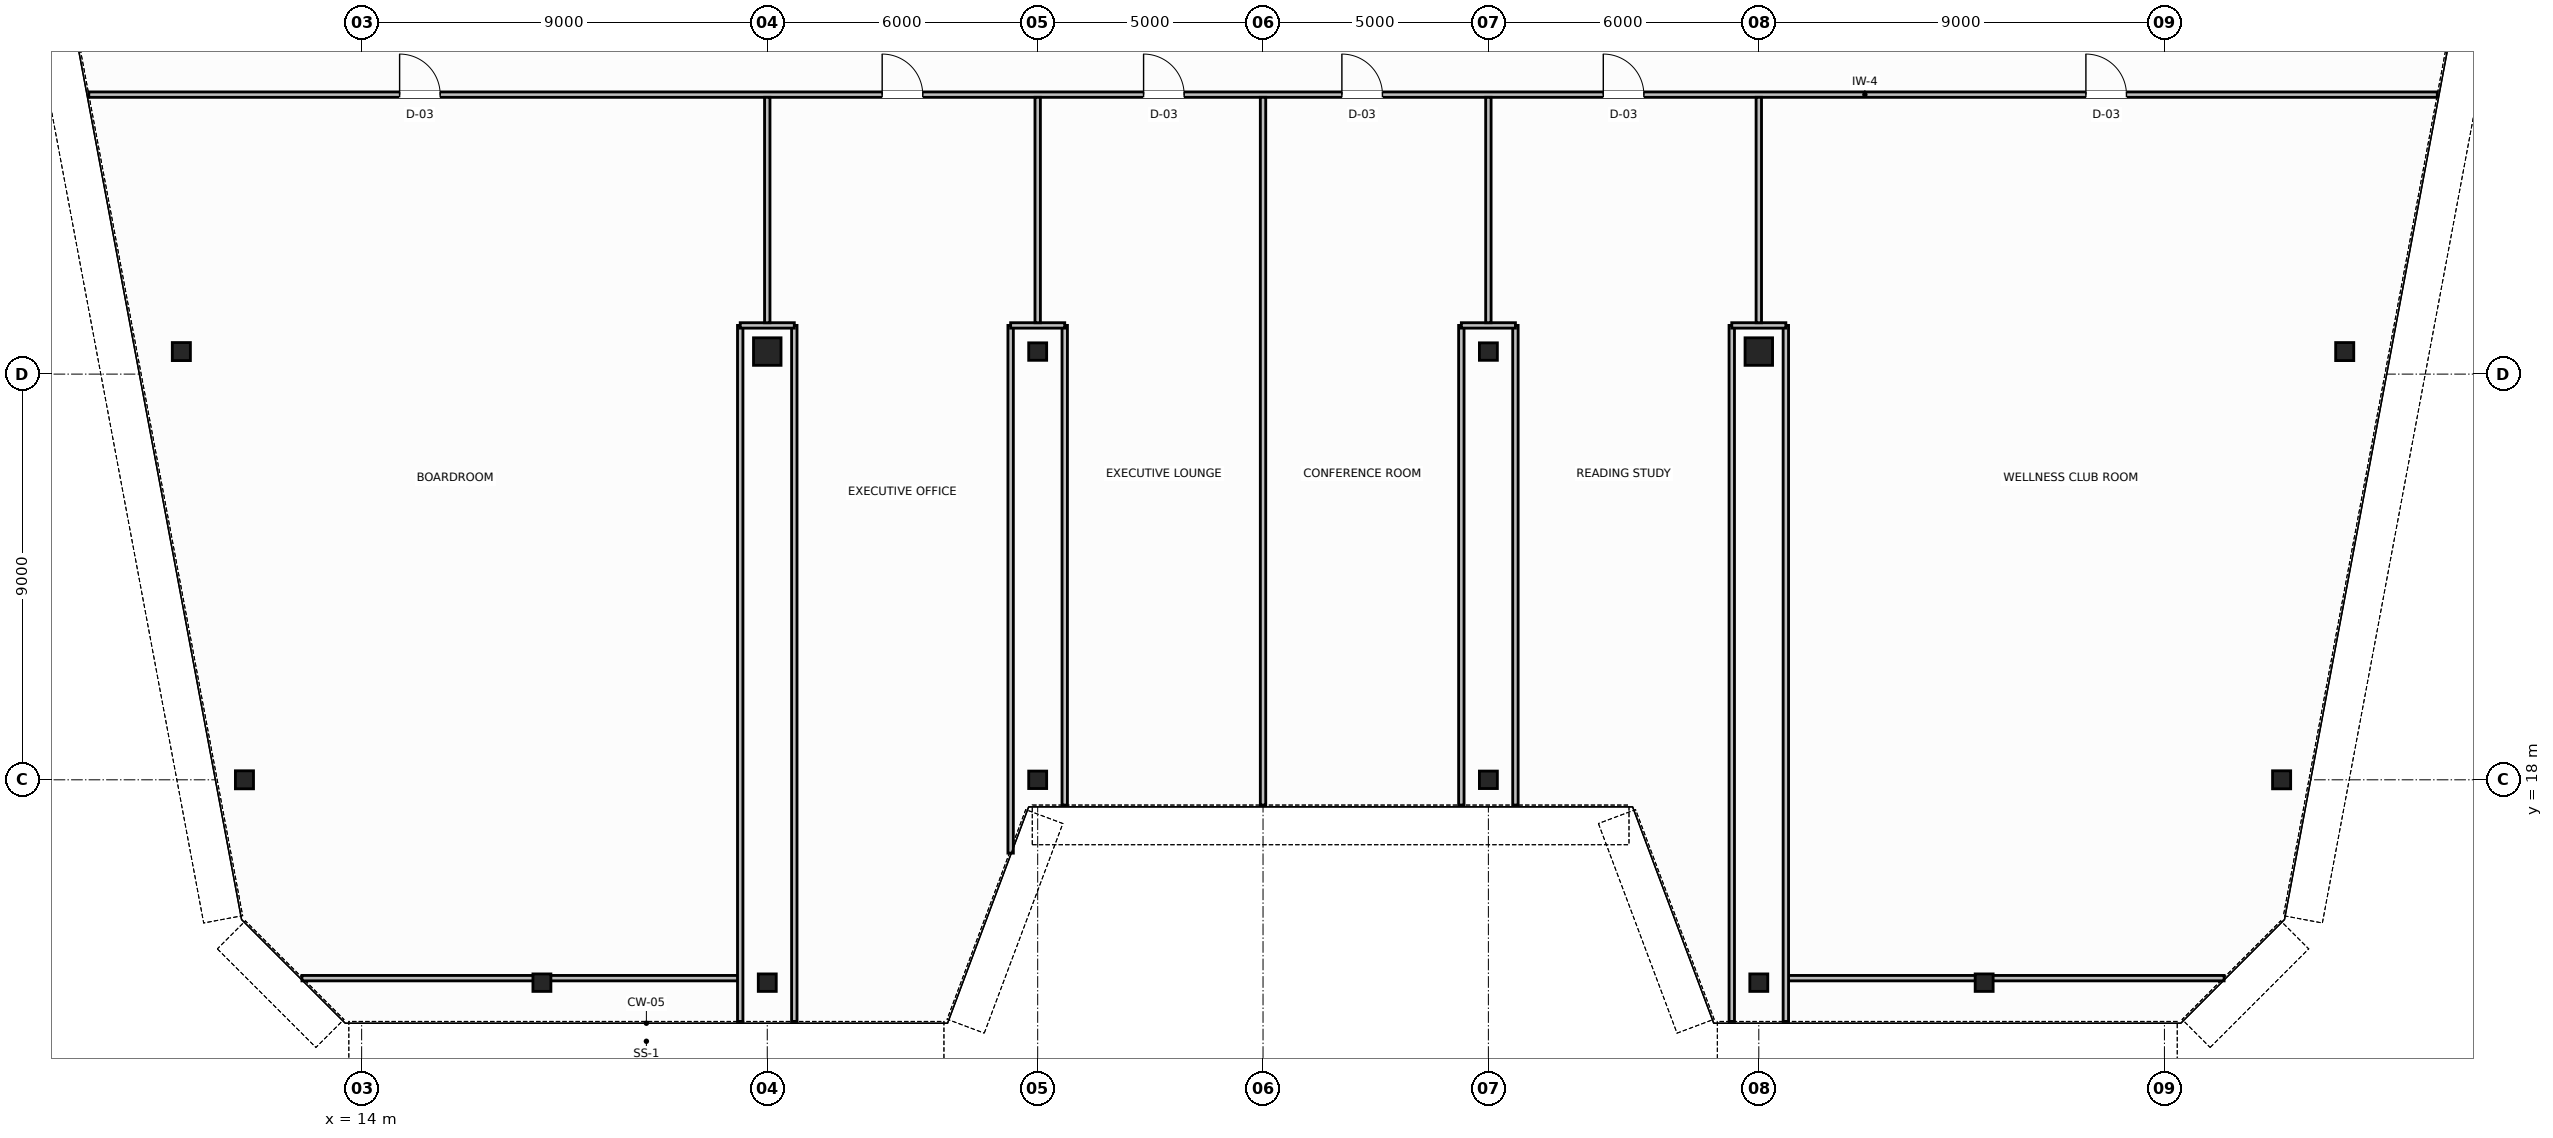
"""IFC4 building model, lengths in metres.
Left out: names, types, materials, properties, quantities, classifications, styles, units other than length and angle.
Written with IfcOpenShell. Run it as: python <this file> out.ifc"""

import sys

from ifc_helpers import new_model, si_unit, direction, frame, frame_2d, origin, origin_2d, place, context, subcontext, project, spatial, rectangle, hollow_circle, i_section, extrude, source, transform, mapped, element, fill, save


model = new_model("IFC4")
c1 = context("Model", 3, precision=1e-05, world=origin(), true_north=direction((0.0, 1.0)))
c2 = subcontext(c1, "Body", "Model", "MODEL_VIEW")
j1 = project(units=[si_unit("LENGTHUNIT", "METRE"), si_unit("PLANEANGLEUNIT", "RADIAN")], contexts=[c1])
p1 = place(None, origin())
s1 = spatial("IfcSite", under=j1, at=p1, CompositionType="ELEMENT")
p2 = place(p1, origin())
s2 = spatial("IfcBuilding", under=s1, at=p2, CompositionType="ELEMENT")
p3 = place(p2, frame((0.0, 0.0, 299.2)))
s3 = spatial("IfcBuildingStorey", under=s2, at=p3, CompositionType="ELEMENT", Elevation=299.2)
m1 = source(origin(), c2, "Body", "SweptSolid", [
    extrude(i_section(OverallWidth=0.401, OverallDepth=0.399, WebThickness=0.025, FlangeThickness=0.035, FilletRadius=0.015, at=origin_2d()), origin(), (0.0, 0.0, 1.0), 4.6),
])
for number, where, z_axis, x_axis in (
    (1, (10.0, 27.5, 0.0), (0.0, 0.0, 1.0), (1.0, 0.0, 0.0)),
    (2, (11.4, 18.0, 0.0), (0.0, 0.0, 1.0), (1.0, 0.0, 0.0)),
    (3, (58.0, 27.5, 0.0), (0.0, 0.0, 1.0), (1.0, 0.0, 0.0)),
    (4, (56.6, 18.0, 0.0), (0.0, 0.0, 1.0), (1.0, 0.0, 0.0)),
):
    element("IfcColumn", number, at=place(p3, frame(where, z_axis=z_axis, x_axis=x_axis)), inside=s3, PredefinedType="COLUMN", context=c2, shape_type="MappedRepresentation", body=[
        mapped(m1, transform((0.0, 0.0, 0.0), scale=1.0)),
    ])
m2 = source(origin(), c2, "Body", "SweptSolid", [
    extrude(hollow_circle(Radius=0.305, WallThickness=0.03, at=origin_2d()), origin(), (0.0, 0.0, 1.0), 4.6),
])
p4 = place(p3, frame((23.0, 27.5, 0.0), z_axis=(0.0, 0.0, 1.0), x_axis=(1.0, 0.0, 0.0)))
e5 = element("IfcColumn", 5, at=p4, inside=s3, PredefinedType="COLUMN", context=c2, shape_type="MappedRepresentation", body=[
    mapped(m2, transform((0.0, 0.0, 0.0), scale=1.0)),
])
m3 = source(origin(), c2, "Body", "SweptSolid", [
    extrude(i_section(OverallWidth=0.398, OverallDepth=0.387, WebThickness=0.021, FlangeThickness=0.029, FilletRadius=0.015, at=origin_2d()), origin(), (0.0, 0.0, 1.0), 4.6),
])
for number, where, z_axis, x_axis in (
    (6, (29.0, 27.5, 0.0), (0.0, 0.0, 1.0), (1.0, 0.0, 0.0)),
    (7, (39.0, 27.5, 0.0), (0.0, 0.0, 1.0), (1.0, 0.0, 0.0)),
):
    element("IfcColumn", number, at=place(p3, frame(where, z_axis=z_axis, x_axis=x_axis)), inside=s3, PredefinedType="COLUMN", context=c2, shape_type="MappedRepresentation", body=[
        mapped(m3, transform((0.0, 0.0, 0.0), scale=1.0)),
    ])
p5 = place(p3, frame((45.0, 27.5, 0.0), z_axis=(0.0, 0.0, 1.0), x_axis=(1.0, 0.0, 0.0)))
e8 = element("IfcColumn", 8, at=p5, inside=s3, PredefinedType="COLUMN", context=c2, shape_type="MappedRepresentation", body=[
    mapped(m2, transform((0.0, 0.0, 0.0), scale=1.0)),
])
for number, where, z_axis, x_axis in (
    (9, (18.0, 13.5, 0.0), (0.0, 0.0, 1.0), (1.0, 0.0, 0.0)),
    (10, (23.0, 13.5, 0.0), (0.0, 0.0, 1.0), (1.0, 0.0, 0.0)),
    (11, (29.0, 18.0, 0.0), (0.0, 0.0, 1.0), (1.0, 0.0, 0.0)),
    (12, (39.0, 18.0, 0.0), (0.0, 0.0, 1.0), (1.0, 0.0, 0.0)),
    (13, (45.0, 13.5, 0.0), (0.0, 0.0, 1.0), (1.0, 0.0, 0.0)),
    (14, (50.0, 13.5, 0.0), (0.0, 0.0, 1.0), (1.0, 0.0, 0.0)),
):
    element("IfcColumn", number, at=place(p3, frame(where, z_axis=z_axis, x_axis=x_axis)), inside=s3, PredefinedType="COLUMN", context=c2, shape_type="MappedRepresentation", body=[
        mapped(m3, transform((0.0, 0.0, 0.0), scale=1.0)),
    ])
p6 = place(p3, frame((7.946, 33.2, 0.0), z_axis=(0.0, 0.0, 1.0), x_axis=(1.0, 0.0, 0.0)))
e15 = element("IfcWall", 15, at=p6, inside=s3, PredefinedType="PARTITIONING", context=c2, shape_type="SweptSolid", body=[
    extrude(rectangle(XDim=52.109, YDim=0.12, at=frame_2d((26.054, 0.0))), origin(), (0.0, 0.0, 1.0), 3.93),
])
p7 = place(p6, frame((6.897, 0.0, 0.0)))
e16 = element("IfcOpeningElement", 16, at=p7, cuts=e15, PredefinedType="OPENING", context=c2, shape_type="SweptSolid", body=[
    extrude(rectangle(XDim=0.9, YDim=2.15, at=frame_2d((0.45, 1.075))), frame((0.0, 0.07, 0.0), z_axis=(0.0, -1.0, 0.0), x_axis=(1.0, 0.0, 0.0)), (0.0, 0.0, 1.0), 0.14),
])
p8 = place(p6, frame((17.604, 0.0, 0.0)))
e17 = element("IfcOpeningElement", 17, at=p8, cuts=e15, PredefinedType="OPENING", context=c2, shape_type="SweptSolid", body=[
    extrude(rectangle(XDim=0.9, YDim=2.15, at=frame_2d((0.45, 1.075))), frame((0.0, 0.07, 0.0), z_axis=(0.0, -1.0, 0.0), x_axis=(1.0, 0.0, 0.0)), (0.0, 0.0, 1.0), 0.14),
])
p9 = place(p6, frame((23.404, 0.0, 0.0)))
e18 = element("IfcOpeningElement", 18, at=p9, cuts=e15, PredefinedType="OPENING", context=c2, shape_type="SweptSolid", body=[
    extrude(rectangle(XDim=0.9, YDim=2.15, at=frame_2d((0.45, 1.075))), frame((0.0, 0.07, 0.0), z_axis=(0.0, -1.0, 0.0), x_axis=(1.0, 0.0, 0.0)), (0.0, 0.0, 1.0), 0.14),
])
p10 = place(p6, frame((27.804, 0.0, 0.0)))
e19 = element("IfcOpeningElement", 19, at=p10, cuts=e15, PredefinedType="OPENING", context=c2, shape_type="SweptSolid", body=[
    extrude(rectangle(XDim=0.9, YDim=2.15, at=frame_2d((0.45, 1.075))), frame((0.0, 0.07, 0.0), z_axis=(0.0, -1.0, 0.0), x_axis=(1.0, 0.0, 0.0)), (0.0, 0.0, 1.0), 0.14),
])
p11 = place(p6, frame((33.604, 0.0, 0.0)))
e20 = element("IfcOpeningElement", 20, at=p11, cuts=e15, PredefinedType="OPENING", context=c2, shape_type="SweptSolid", body=[
    extrude(rectangle(XDim=0.9, YDim=2.15, at=frame_2d((0.45, 1.075))), frame((0.0, 0.07, 0.0), z_axis=(0.0, -1.0, 0.0), x_axis=(1.0, 0.0, 0.0)), (0.0, 0.0, 1.0), 0.14),
])
p12 = place(p6, frame((44.312, 0.0, 0.0)))
e21 = element("IfcOpeningElement", 21, at=p12, cuts=e15, PredefinedType="OPENING", context=c2, shape_type="SweptSolid", body=[
    extrude(rectangle(XDim=0.9, YDim=2.15, at=frame_2d((0.45, 1.075))), frame((0.0, 0.07, 0.0), z_axis=(0.0, -1.0, 0.0), x_axis=(1.0, 0.0, 0.0)), (0.0, 0.0, 1.0), 0.14),
])
for number, where, z_axis, x_axis in (
    (22, (12.676, 13.6, 0.0), (0.0, 0.0, 1.0), (1.0, 0.0, 0.0)),
    (23, (45.64, 13.6, 0.0), (0.0, 0.0, 1.0), (1.0, 0.0, 0.0)),
):
    element("IfcWall", number, at=place(p3, frame(where, z_axis=z_axis, x_axis=x_axis)), inside=s3, PredefinedType="PARTITIONING", context=c2, shape_type="SweptSolid", body=[
        extrude(rectangle(XDim=9.684, YDim=0.12, at=frame_2d((4.842, 0.0))), origin(), (0.0, 0.0, 1.0), 3.09),
    ])
for number, where, z_axis, x_axis in (
    (24, (22.4, 12.64, 0.0), (0.0, 0.0, 1.0), (0.0, 1.0, 0.0)),
    (25, (23.6, 12.64, 0.0), (0.0, 0.0, 1.0), (0.0, 1.0, 0.0)),
):
    element("IfcWall", number, at=place(p3, frame(where, z_axis=z_axis, x_axis=x_axis)), inside=s3, PredefinedType="PARTITIONING", context=c2, shape_type="SweptSolid", body=[
        extrude(rectangle(XDim=15.44, YDim=0.12, at=frame_2d((7.72, 0.0))), origin(), (0.0, 0.0, 1.0), 4.3),
    ])
p13 = place(p3, frame((22.4, 28.08, 0.0), z_axis=(0.0, 0.0, 1.0), x_axis=(1.0, 0.0, 0.0)))
e26 = element("IfcWall", 26, at=p13, inside=s3, PredefinedType="PARTITIONING", context=c2, shape_type="SweptSolid", body=[
    extrude(rectangle(XDim=1.2, YDim=0.12, at=frame_2d((0.6, 0.0))), origin(), (0.0, 0.0, 1.0), 4.3),
])
p14 = place(p3, frame((23.0, 28.14, 0.0), z_axis=(0.0, 0.0, 1.0), x_axis=(0.0, 1.0, 0.0)))
e27 = element("IfcWall", 27, at=p14, inside=s3, PredefinedType="PARTITIONING", context=c2, shape_type="SweptSolid", body=[
    extrude(rectangle(XDim=5.0, YDim=0.12, at=frame_2d((2.5, 0.0))), origin(), (0.0, 0.0, 1.0), 3.09),
])
p15 = place(p3, frame((28.4, 16.373, 0.0), z_axis=(0.0, 0.0, 1.0), x_axis=(0.0, 1.0, 0.0)))
e28 = element("IfcWall", 28, at=p15, inside=s3, PredefinedType="PARTITIONING", context=c2, shape_type="SweptSolid", body=[
    extrude(rectangle(XDim=11.707, YDim=0.12, at=frame_2d((5.854, 0.0))), origin(), (0.0, 0.0, 1.0), 4.3),
])
p16 = place(p3, frame((29.6, 17.44, 0.0), z_axis=(0.0, 0.0, 1.0), x_axis=(0.0, 1.0, 0.0)))
e29 = element("IfcWall", 29, at=p16, inside=s3, PredefinedType="PARTITIONING", context=c2, shape_type="SweptSolid", body=[
    extrude(rectangle(XDim=10.64, YDim=0.12, at=frame_2d((5.32, 0.0))), origin(), (0.0, 0.0, 1.0), 4.3),
])
p17 = place(p3, frame((28.4, 28.08, 0.0), z_axis=(0.0, 0.0, 1.0), x_axis=(1.0, 0.0, 0.0)))
e30 = element("IfcWall", 30, at=p17, inside=s3, PredefinedType="PARTITIONING", context=c2, shape_type="SweptSolid", body=[
    extrude(rectangle(XDim=1.2, YDim=0.12, at=frame_2d((0.6, 0.0))), origin(), (0.0, 0.0, 1.0), 4.3),
])
p18 = place(p3, frame((29.0, 28.14, 0.0), z_axis=(0.0, 0.0, 1.0), x_axis=(0.0, 1.0, 0.0)))
e31 = element("IfcWall", 31, at=p18, inside=s3, PredefinedType="PARTITIONING", context=c2, shape_type="SweptSolid", body=[
    extrude(rectangle(XDim=5.0, YDim=0.12, at=frame_2d((2.5, 0.0))), origin(), (0.0, 0.0, 1.0), 3.09),
])
for number, where, z_axis, x_axis in (
    (32, (38.4, 17.44, 0.0), (0.0, 0.0, 1.0), (0.0, 1.0, 0.0)),
    (33, (39.6, 17.44, 0.0), (0.0, 0.0, 1.0), (0.0, 1.0, 0.0)),
):
    element("IfcWall", number, at=place(p3, frame(where, z_axis=z_axis, x_axis=x_axis)), inside=s3, PredefinedType="PARTITIONING", context=c2, shape_type="SweptSolid", body=[
        extrude(rectangle(XDim=10.64, YDim=0.12, at=frame_2d((5.32, 0.0))), origin(), (0.0, 0.0, 1.0), 4.3),
    ])
p19 = place(p3, frame((38.4, 28.08, 0.0), z_axis=(0.0, 0.0, 1.0), x_axis=(1.0, 0.0, 0.0)))
e34 = element("IfcWall", 34, at=p19, inside=s3, PredefinedType="PARTITIONING", context=c2, shape_type="SweptSolid", body=[
    extrude(rectangle(XDim=1.2, YDim=0.12, at=frame_2d((0.6, 0.0))), origin(), (0.0, 0.0, 1.0), 4.3),
])
p20 = place(p3, frame((39.0, 28.14, 0.0), z_axis=(0.0, 0.0, 1.0), x_axis=(0.0, 1.0, 0.0)))
e35 = element("IfcWall", 35, at=p20, inside=s3, PredefinedType="PARTITIONING", context=c2, shape_type="SweptSolid", body=[
    extrude(rectangle(XDim=5.0, YDim=0.12, at=frame_2d((2.5, 0.0))), origin(), (0.0, 0.0, 1.0), 3.09),
])
for number, where, z_axis, x_axis in (
    (36, (44.4, 12.64, 0.0), (0.0, 0.0, 1.0), (0.0, 1.0, 0.0)),
    (37, (45.6, 12.64, 0.0), (0.0, 0.0, 1.0), (0.0, 1.0, 0.0)),
):
    element("IfcWall", number, at=place(p3, frame(where, z_axis=z_axis, x_axis=x_axis)), inside=s3, PredefinedType="PARTITIONING", context=c2, shape_type="SweptSolid", body=[
        extrude(rectangle(XDim=15.44, YDim=0.12, at=frame_2d((7.72, 0.0))), origin(), (0.0, 0.0, 1.0), 4.3),
    ])
p21 = place(p3, frame((44.4, 28.08, 0.0), z_axis=(0.0, 0.0, 1.0), x_axis=(1.0, 0.0, 0.0)))
e38 = element("IfcWall", 38, at=p21, inside=s3, PredefinedType="PARTITIONING", context=c2, shape_type="SweptSolid", body=[
    extrude(rectangle(XDim=1.2, YDim=0.12, at=frame_2d((0.6, 0.0))), origin(), (0.0, 0.0, 1.0), 4.3),
])
p22 = place(p3, frame((45.0, 28.14, 0.0), z_axis=(0.0, 0.0, 1.0), x_axis=(0.0, 1.0, 0.0)))
e39 = element("IfcWall", 39, at=p22, inside=s3, PredefinedType="PARTITIONING", context=c2, shape_type="SweptSolid", body=[
    extrude(rectangle(XDim=5.0, YDim=0.12, at=frame_2d((2.5, 0.0))), origin(), (0.0, 0.0, 1.0), 3.09),
])
p23 = place(p3, frame((34.0, 17.44, 0.0), z_axis=(0.0, 0.0, 1.0), x_axis=(0.0, 1.0, 0.0)))
e40 = element("IfcWall", 40, at=p23, inside=s3, PredefinedType="PARTITIONING", context=c2, shape_type="SweptSolid", body=[
    extrude(rectangle(XDim=15.7, YDim=0.12, at=frame_2d((7.85, 0.0))), origin(), (0.0, 0.0, 1.0), 4.3),
])
m4 = source(origin(), c2, "Body", "SweptSolid", [
    extrude(rectangle(XDim=0.9, YDim=2.15, at=frame_2d((0.45, 1.075))), frame((0.0, 0.025, 0.0), z_axis=(0.0, -1.0, 0.0), x_axis=(1.0, 0.0, 0.0)), (0.0, 0.0, 1.0), 0.05),
])
p24 = place(p7, origin())
e41 = element("IfcDoor", 41, at=p24, inside=s3, OperationType="SINGLE_SWING_LEFT", PredefinedType="DOOR", context=c2, shape_type="MappedRepresentation", body=[
    mapped(m4, transform((0.0, 0.0, 0.0), scale=1.0)),
])
fill(e16, e41)
p25 = place(p8, origin())
e42 = element("IfcDoor", 42, at=p25, inside=s3, OperationType="SINGLE_SWING_RIGHT", PredefinedType="DOOR", context=c2, shape_type="MappedRepresentation", body=[
    mapped(m4, transform((0.0, 0.0, 0.0), scale=1.0)),
])
fill(e17, e42)
p26 = place(p9, origin())
e43 = element("IfcDoor", 43, at=p26, inside=s3, OperationType="SINGLE_SWING_LEFT", PredefinedType="DOOR", context=c2, shape_type="MappedRepresentation", body=[
    mapped(m4, transform((0.0, 0.0, 0.0), scale=1.0)),
])
fill(e18, e43)
p27 = place(p10, origin())
e44 = element("IfcDoor", 44, at=p27, inside=s3, OperationType="SINGLE_SWING_RIGHT", PredefinedType="DOOR", context=c2, shape_type="MappedRepresentation", body=[
    mapped(m4, transform((0.0, 0.0, 0.0), scale=1.0)),
])
fill(e19, e44)
p28 = place(p11, origin())
e45 = element("IfcDoor", 45, at=p28, inside=s3, OperationType="SINGLE_SWING_LEFT", PredefinedType="DOOR", context=c2, shape_type="MappedRepresentation", body=[
    mapped(m4, transform((0.0, 0.0, 0.0), scale=1.0)),
])
fill(e20, e45)
p29 = place(p12, origin())
e46 = element("IfcDoor", 46, at=p29, inside=s3, OperationType="SINGLE_SWING_RIGHT", PredefinedType="DOOR", context=c2, shape_type="MappedRepresentation", body=[
    mapped(m4, transform((0.0, 0.0, 0.0), scale=1.0)),
])
fill(e21, e46)
save(model, sys.argv[1])
